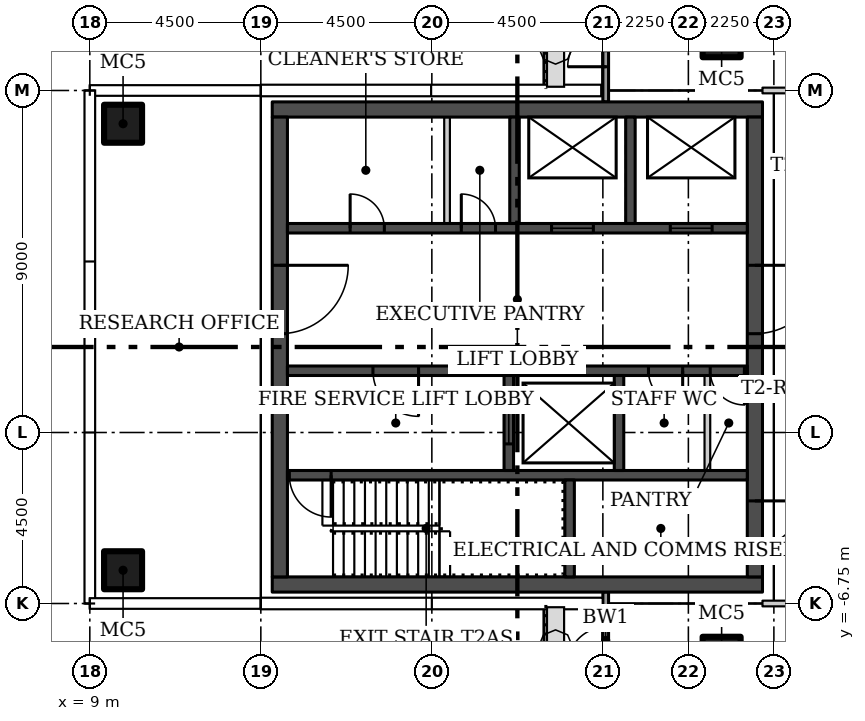
"""IFC4 building model, lengths in metres.
Left out: names, types, materials, properties, quantities, classifications, styles, units other than length and angle.
Written with IfcOpenShell. Run it as: python <this file> out.ifc"""

import sys

from ifc_helpers import new_model, si_unit, direction, frame, frame_2d, origin, origin_2d, place, context, subcontext, project, spatial, rectangle, hollow_rectangle, extrude, element, fill, save


model = new_model("IFC4")
c1 = context("Model", 3, precision=1e-05, world=origin(), true_north=direction((0.0, 1.0)))
c2 = subcontext(c1, "Body", "Model", "MODEL_VIEW")
j1 = project(units=[si_unit("LENGTHUNIT", "METRE"), si_unit("PLANEANGLEUNIT", "RADIAN")], contexts=[c1])
p1 = place(None, origin())
s1 = spatial("IfcSite", under=j1, at=p1, CompositionType="ELEMENT")
p2 = place(p1, origin())
s2 = spatial("IfcBuilding", under=s1, at=p2, CompositionType="ELEMENT")
p3 = place(p2, frame((0.0, 0.0, 186.6)))
s3 = spatial("IfcBuildingStorey", under=s2, at=p3, CompositionType="ELEMENT", Elevation=186.6)
for number, where in (
    (1, (25.625, 8.125, 0.0)),
    (2, (25.625, -8.125, 0.0)),
    (3, (9.875, -5.875, 0.0)),
    (4, (9.875, 5.875, 0.0)),
):
    element("IfcColumn", number, at=place(p3, frame(where)), inside=s3, PredefinedType="COLUMN", context=c2, shape_type="SweptSolid", body=[
        extrude(hollow_rectangle(XDim=1.0, YDim=1.0, WallThickness=0.04, at=origin_2d()), origin(), (0.0, 0.0, 1.0), 3.55),
    ])
p4 = place(p3, frame((26.7, 6.75, 0.0)))
e5 = element("IfcWall", 5, at=p4, inside=s3, PredefinedType="PARTITIONING", context=c2, shape_type="SweptSolid", body=[
    extrude(rectangle(XDim=14.1, YDim=0.15, at=frame_2d((7.05, 0.0))), origin(), (0.0, 0.0, 1.0), 3.55),
])
p5 = place(p4, frame((10.8, 0.0, 0.0)))
e6 = element("IfcOpeningElement", 6, at=p5, cuts=e5, PredefinedType="OPENING", context=c2, shape_type="SweptSolid", body=[
    extrude(rectangle(XDim=1.5, YDim=2.1, at=frame_2d((0.75, 1.05))), frame((0.0, 0.085, 0.0), z_axis=(0.0, -1.0, 0.0), x_axis=(1.0, 0.0, 0.0)), (0.0, 0.0, 1.0), 0.17),
])
p6 = place(p4, frame((6.6, 0.0, 0.0)))
e7 = element("IfcOpeningElement", 7, at=p6, cuts=e5, PredefinedType="OPENING", context=c2, shape_type="SweptSolid", body=[
    extrude(rectangle(XDim=0.9, YDim=2.1, at=frame_2d((0.45, 1.05))), frame((0.0, 0.085, 0.0), z_axis=(0.0, -1.0, 0.0), x_axis=(1.0, 0.0, 0.0)), (0.0, 0.0, 1.0), 0.17),
])
p7 = place(p4, frame((1.8, 0.0, 0.0)))
e8 = element("IfcOpeningElement", 8, at=p7, cuts=e5, PredefinedType="OPENING", context=c2, shape_type="SweptSolid", body=[
    extrude(rectangle(XDim=1.5, YDim=2.1, at=frame_2d((0.75, 1.05))), frame((0.0, 0.085, 0.0), z_axis=(0.0, -1.0, 0.0), x_axis=(1.0, 0.0, 0.0)), (0.0, 0.0, 1.0), 0.17),
])
p8 = place(p3, frame((40.8, -6.75, 0.0), z_axis=(0.0, 0.0, 1.0), x_axis=(-1.0, 0.0, 0.0)))
e9 = element("IfcWall", 9, at=p8, inside=s3, PredefinedType="PARTITIONING", context=c2, shape_type="SweptSolid", body=[
    extrude(rectangle(XDim=14.1, YDim=0.15, at=frame_2d((7.05, 0.0))), origin(), (0.0, 0.0, 1.0), 3.55),
])
p9 = place(p8, frame((6.3, 0.0, 0.0)))
e10 = element("IfcOpeningElement", 10, at=p9, cuts=e9, PredefinedType="OPENING", context=c2, shape_type="SweptSolid", body=[
    extrude(rectangle(XDim=1.5, YDim=2.1, at=frame_2d((0.75, 1.05))), frame((0.0, 0.085, 0.0), z_axis=(0.0, -1.0, 0.0), x_axis=(1.0, 0.0, 0.0)), (0.0, 0.0, 1.0), 0.17),
])
p10 = place(p3, frame((22.575, 6.448, 0.0), z_axis=(0.0, 0.0, 1.0), x_axis=(0.0, 1.0, 0.0)))
e11 = element("IfcWall", 11, at=p10, inside=s3, PredefinedType="SOLIDWALL", context=c2, shape_type="SweptSolid", body=[
    extrude(rectangle(XDim=2.552, YDim=0.15, at=frame_2d((1.276, 0.0))), origin(), (0.0, 0.0, 1.0), 3.45),
])
p11 = place(p10, frame((0.927, 0.0, 0.0)))
e12 = element("IfcOpeningElement", 12, at=p11, cuts=e11, PredefinedType="OPENING", context=c2, shape_type="SweptSolid", body=[
    extrude(rectangle(XDim=1.0, YDim=2.4, at=frame_2d((0.5, 1.2))), frame((0.0, 0.085, 0.0), z_axis=(0.0, -1.0, 0.0), x_axis=(1.0, 0.0, 0.0)), (0.0, 0.0, 1.0), 0.17),
])
p12 = place(p3, frame((22.575, -9.0, 0.0), z_axis=(0.0, 0.0, 1.0), x_axis=(0.0, 1.0, 0.0)))
e13 = element("IfcWall", 13, at=p12, inside=s3, PredefinedType="SOLIDWALL", context=c2, shape_type="SweptSolid", body=[
    extrude(rectangle(XDim=2.557, YDim=0.15, at=frame_2d((1.278, 0.0))), origin(), (0.0, 0.0, 1.0), 3.45),
])
p13 = place(p12, frame((0.625, 0.0, 0.0)))
e14 = element("IfcOpeningElement", 14, at=p13, cuts=e13, PredefinedType="OPENING", context=c2, shape_type="SweptSolid", body=[
    extrude(rectangle(XDim=1.0, YDim=2.4, at=frame_2d((0.5, 1.2))), frame((0.0, 0.085, 0.0), z_axis=(0.0, -1.0, 0.0), x_axis=(1.0, 0.0, 0.0)), (0.0, 0.0, 1.0), 0.17),
])
for number, where in (
    (15, (13.8, -6.25, 0.0)),
    (16, (13.8, 6.25, 0.0)),
):
    element("IfcWall", number, at=place(p3, frame(where)), inside=s3, PredefinedType="SHEAR", context=c2, shape_type="SweptSolid", body=[
        extrude(rectangle(XDim=12.9, YDim=0.4, at=frame_2d((6.45, 0.0))), origin(), (0.0, 0.0, 1.0), 3.55),
    ])
p14 = place(p3, frame((14.0, 6.05, 0.0), z_axis=(0.0, 0.0, 1.0), x_axis=(0.0, -1.0, 0.0)))
e17 = element("IfcWall", 17, at=p14, inside=s3, PredefinedType="SHEAR", context=c2, shape_type="SweptSolid", body=[
    extrude(rectangle(XDim=12.1, YDim=0.4, at=frame_2d((6.05, 0.0))), origin(), (0.0, 0.0, 1.0), 3.55),
])
p15 = place(p14, frame((3.9, 0.0, 0.0)))
e18 = element("IfcOpeningElement", 18, at=p15, cuts=e17, PredefinedType="OPENING", context=c2, shape_type="SweptSolid", body=[
    extrude(rectangle(XDim=1.8, YDim=2.4, at=frame_2d((0.9, 1.2))), frame((0.0, 0.21, 0.0), z_axis=(0.0, -1.0, 0.0), x_axis=(1.0, 0.0, 0.0)), (0.0, 0.0, 1.0), 0.42),
])
p16 = place(p3, frame((26.5, 6.05, 0.0), z_axis=(0.0, 0.0, 1.0), x_axis=(0.0, -1.0, 0.0)))
e19 = element("IfcWall", 19, at=p16, inside=s3, PredefinedType="SHEAR", context=c2, shape_type="SweptSolid", body=[
    extrude(rectangle(XDim=12.1, YDim=0.4, at=frame_2d((6.05, 0.0))), origin(), (0.0, 0.0, 1.0), 3.55),
])
p17 = place(p16, frame((10.1, 0.0, 0.0)))
e20 = element("IfcOpeningElement", 20, at=p17, cuts=e19, PredefinedType="OPENING", context=c2, shape_type="SweptSolid", body=[
    extrude(rectangle(XDim=1.2, YDim=2.1, at=frame_2d((0.6, 1.05))), frame((0.0, 0.21, 0.0), z_axis=(0.0, -1.0, 0.0), x_axis=(1.0, 0.0, 0.0)), (0.0, 0.0, 1.0), 0.42),
])
p18 = place(p16, frame((3.9, 0.0, 0.0)))
e21 = element("IfcOpeningElement", 21, at=p18, cuts=e19, PredefinedType="OPENING", context=c2, shape_type="SweptSolid", body=[
    extrude(rectangle(XDim=1.8, YDim=2.4, at=frame_2d((0.9, 1.2))), frame((0.0, 0.21, 0.0), z_axis=(0.0, -1.0, 0.0), x_axis=(1.0, 0.0, 0.0)), (0.0, 0.0, 1.0), 0.42),
])
p19 = place(p3, frame((26.3, -3.375, 0.0), z_axis=(0.0, 0.0, 1.0), x_axis=(-1.0, 0.0, 0.0)))
e22 = element("IfcWall", 22, at=p19, inside=s3, PredefinedType="SHEAR", context=c2, shape_type="SweptSolid", body=[
    extrude(rectangle(XDim=12.1, YDim=0.25, at=frame_2d((6.05, 0.0))), origin(), (0.0, 0.0, 1.0), 3.55),
])
p20 = place(p19, frame((10.95, 0.0, 0.0)))
e23 = element("IfcOpeningElement", 23, at=p20, cuts=e22, PredefinedType="OPENING", context=c2, shape_type="SweptSolid", body=[
    extrude(rectangle(XDim=1.1, YDim=2.1, at=frame_2d((0.55, 1.05))), frame((0.0, 0.135, 0.0), z_axis=(0.0, -1.0, 0.0), x_axis=(1.0, 0.0, 0.0)), (0.0, 0.0, 1.0), 0.27),
])
p21 = place(p3, frame((21.625, -6.05, 0.0), z_axis=(0.0, 0.0, 1.0), x_axis=(0.0, 1.0, 0.0)))
e24 = element("IfcWall", 24, at=p21, inside=s3, PredefinedType="SHEAR", context=c2, shape_type="SweptSolid", body=[
    extrude(rectangle(XDim=2.55, YDim=0.25, at=frame_2d((1.275, 0.0))), origin(), (0.0, 0.0, 1.0), 3.55),
])
p22 = place(p3, frame((26.3, -0.625, 0.0), z_axis=(0.0, 0.0, 1.0), x_axis=(-1.0, 0.0, 0.0)))
e25 = element("IfcWall", 25, at=p22, inside=s3, PredefinedType="SHEAR", context=c2, shape_type="SweptSolid", body=[
    extrude(rectangle(XDim=12.1, YDim=0.25, at=frame_2d((6.05, 0.0))), origin(), (0.0, 0.0, 1.0), 3.55),
])
p23 = place(p22, frame((8.65, 0.0, 0.0)))
e26 = element("IfcOpeningElement", 26, at=p23, cuts=e25, PredefinedType="OPENING", context=c2, shape_type="SweptSolid", body=[
    extrude(rectangle(XDim=1.2, YDim=2.1, at=frame_2d((0.6, 1.05))), frame((0.0, 0.135, 0.0), z_axis=(0.0, -1.0, 0.0), x_axis=(1.0, 0.0, 0.0)), (0.0, 0.0, 1.0), 0.27),
])
p24 = place(p22, frame((1.7, 0.0, 0.0)))
e27 = element("IfcOpeningElement", 27, at=p24, cuts=e25, PredefinedType="OPENING", context=c2, shape_type="SweptSolid", body=[
    extrude(rectangle(XDim=0.9, YDim=2.1, at=frame_2d((0.45, 1.05))), frame((0.0, 0.135, 0.0), z_axis=(0.0, -1.0, 0.0), x_axis=(1.0, 0.0, 0.0)), (0.0, 0.0, 1.0), 0.27),
])
p25 = place(p22, frame((0.075, 0.0, 0.0)))
e28 = element("IfcOpeningElement", 28, at=p25, cuts=e25, PredefinedType="OPENING", context=c2, shape_type="SweptSolid", body=[
    extrude(rectangle(XDim=0.9, YDim=2.1, at=frame_2d((0.45, 1.05))), frame((0.0, 0.135, 0.0), z_axis=(0.0, -1.0, 0.0), x_axis=(1.0, 0.0, 0.0)), (0.0, 0.0, 1.0), 0.27),
])
p26 = place(p3, frame((20.025, -3.25, 0.0), z_axis=(0.0, 0.0, 1.0), x_axis=(0.0, 1.0, 0.0)))
e29 = element("IfcWall", 29, at=p26, inside=s3, PredefinedType="SHEAR", context=c2, shape_type="SweptSolid", body=[
    extrude(rectangle(XDim=2.5, YDim=0.25, at=frame_2d((1.25, 0.0))), origin(), (0.0, 0.0, 1.0), 3.55),
])
p27 = place(p26, frame((0.7, 0.0, 0.0)))
e30 = element("IfcOpeningElement", 30, at=p27, cuts=e29, PredefinedType="OPENING", context=c2, shape_type="SweptSolid", body=[
    extrude(rectangle(XDim=1.1, YDim=2.1, at=frame_2d((0.55, 1.05))), frame((0.0, 0.135, 0.0), z_axis=(0.0, -1.0, 0.0), x_axis=(1.0, 0.0, 0.0)), (0.0, 0.0, 1.0), 0.27),
])
p28 = place(p3, frame((22.925, -3.25, 0.0), z_axis=(0.0, 0.0, 1.0), x_axis=(0.0, 1.0, 0.0)))
e31 = element("IfcWall", 31, at=p28, inside=s3, PredefinedType="SHEAR", context=c2, shape_type="SweptSolid", body=[
    extrude(rectangle(XDim=2.5, YDim=0.25, at=frame_2d((1.25, 0.0))), origin(), (0.0, 0.0, 1.0), 3.55),
])
p29 = place(p3, frame((25.25, -3.25, 0.0), z_axis=(0.0, 0.0, 1.0), x_axis=(0.0, 1.0, 0.0)))
e32 = element("IfcWall", 32, at=p29, inside=s3, PredefinedType="PARTITIONING", context=c2, shape_type="SweptSolid", body=[
    extrude(rectangle(XDim=2.5, YDim=0.15, at=frame_2d((1.25, 0.0))), origin(), (0.0, 0.0, 1.0), 3.55),
])
p30 = place(p3, frame((14.2, 3.125, 0.0)))
e33 = element("IfcWall", 33, at=p30, inside=s3, PredefinedType="SHEAR", context=c2, shape_type="SweptSolid", body=[
    extrude(rectangle(XDim=12.1, YDim=0.25, at=frame_2d((6.05, 0.0))), origin(), (0.0, 0.0, 1.0), 3.55),
])
p31 = place(p30, frame((6.95, 0.0, 0.0)))
e34 = element("IfcOpeningElement", 34, at=p31, cuts=e33, PredefinedType="OPENING", context=c2, shape_type="SweptSolid", body=[
    extrude(rectangle(XDim=1.1, YDim=2.1, at=frame_2d((0.55, 1.05))), frame((0.0, 0.135, 0.0), z_axis=(0.0, -1.0, 0.0), x_axis=(1.0, 0.0, 0.0)), (0.0, 0.0, 1.0), 0.27),
])
p32 = place(p30, frame((10.075, 0.0, 0.0)))
e35 = element("IfcOpeningElement", 35, at=p32, cuts=e33, PredefinedType="OPENING", context=c2, shape_type="SweptSolid", body=[
    extrude(rectangle(XDim=1.1, YDim=2.1, at=frame_2d((0.55, 1.05))), frame((0.0, 0.135, 0.0), z_axis=(0.0, -1.0, 0.0), x_axis=(1.0, 0.0, 0.0)), (0.0, 0.0, 1.0), 0.27),
])
p33 = place(p30, frame((1.65, 0.0, 0.0)))
e36 = element("IfcOpeningElement", 36, at=p33, cuts=e33, PredefinedType="OPENING", context=c2, shape_type="SweptSolid", body=[
    extrude(rectangle(XDim=0.9, YDim=2.1, at=frame_2d((0.45, 1.05))), frame((0.0, 0.135, 0.0), z_axis=(0.0, -1.0, 0.0), x_axis=(1.0, 0.0, 0.0)), (0.0, 0.0, 1.0), 0.27),
])
p34 = place(p30, frame((4.575, 0.0, 0.0)))
e37 = element("IfcOpeningElement", 37, at=p34, cuts=e33, PredefinedType="OPENING", context=c2, shape_type="SweptSolid", body=[
    extrude(rectangle(XDim=0.9, YDim=2.1, at=frame_2d((0.45, 1.05))), frame((0.0, 0.135, 0.0), z_axis=(0.0, -1.0, 0.0), x_axis=(1.0, 0.0, 0.0)), (0.0, 0.0, 1.0), 0.27),
])
for number, where, z_axis, x_axis in (
    (38, (20.175, 3.25, 0.0), (0.0, 0.0, 1.0), (0.0, 1.0, 0.0)),
    (39, (23.225, 3.25, 0.0), (0.0, 0.0, 1.0), (0.0, 1.0, 0.0)),
):
    element("IfcWall", number, at=place(p3, frame(where, z_axis=z_axis, x_axis=x_axis)), inside=s3, PredefinedType="SHEAR", context=c2, shape_type="SweptSolid", body=[
        extrude(rectangle(XDim=2.8, YDim=0.25, at=frame_2d((1.4, 0.0))), origin(), (0.0, 0.0, 1.0), 3.55),
    ])
p35 = place(p3, frame((18.4, 3.25, 0.0), z_axis=(0.0, 0.0, 1.0), x_axis=(0.0, 1.0, 0.0)))
e40 = element("IfcWall", 40, at=p35, inside=s3, PredefinedType="PARTITIONING", context=c2, shape_type="SweptSolid", body=[
    extrude(rectangle(XDim=2.8, YDim=0.15, at=frame_2d((1.4, 0.0))), origin(), (0.0, 0.0, 1.0), 3.55),
])
p36 = place(p11, origin())
e41 = element("IfcDoor", 41, at=p36, inside=s3, OperationType="SINGLE_SWING_LEFT", PredefinedType="DOOR", context=c2, shape_type="SweptSolid", body=[
    extrude(rectangle(XDim=1.0, YDim=2.4, at=frame_2d((0.5, 1.2))), frame((0.0, 0.025, 0.0), z_axis=(0.0, -1.0, 0.0), x_axis=(1.0, 0.0, 0.0)), (0.0, 0.0, 1.0), 0.05),
])
fill(e12, e41)
p37 = place(p13, origin())
e42 = element("IfcDoor", 42, at=p37, inside=s3, OperationType="SINGLE_SWING_LEFT", PredefinedType="DOOR", context=c2, shape_type="SweptSolid", body=[
    extrude(rectangle(XDim=1.0, YDim=2.4, at=frame_2d((0.5, 1.2))), frame((0.0, 0.025, 0.0), z_axis=(0.0, -1.0, 0.0), x_axis=(1.0, 0.0, 0.0)), (0.0, 0.0, 1.0), 0.05),
])
fill(e14, e42)
p38 = place(p15, origin())
e43 = element("IfcDoor", 43, at=p38, inside=s3, OperationType="DOUBLE_DOOR_SINGLE_SWING", PredefinedType="DOOR", context=c2, shape_type="SweptSolid", body=[
    extrude(rectangle(XDim=1.8, YDim=2.4, at=frame_2d((0.9, 1.2))), frame((0.0, 0.025, 0.0), z_axis=(0.0, -1.0, 0.0), x_axis=(1.0, 0.0, 0.0)), (0.0, 0.0, 1.0), 0.05),
])
fill(e18, e43)
p39 = place(p17, origin())
e44 = element("IfcDoor", 44, at=p39, inside=s3, OperationType="SINGLE_SWING_RIGHT", PredefinedType="DOOR", context=c2, shape_type="SweptSolid", body=[
    extrude(rectangle(XDim=1.2, YDim=2.1, at=frame_2d((0.6, 1.05))), frame((0.0, 0.025, 0.0), z_axis=(0.0, -1.0, 0.0), x_axis=(1.0, 0.0, 0.0)), (0.0, 0.0, 1.0), 0.05),
])
fill(e20, e44)
p40 = place(p18, origin())
e45 = element("IfcDoor", 45, at=p40, inside=s3, OperationType="DOUBLE_DOOR_SINGLE_SWING", PredefinedType="DOOR", context=c2, shape_type="SweptSolid", body=[
    extrude(rectangle(XDim=1.8, YDim=2.4, at=frame_2d((0.9, 1.2))), frame((0.0, 0.025, 0.0), z_axis=(0.0, -1.0, 0.0), x_axis=(1.0, 0.0, 0.0)), (0.0, 0.0, 1.0), 0.05),
])
fill(e21, e45)
p41 = place(p20, origin())
e46 = element("IfcDoor", 46, at=p41, inside=s3, OperationType="SINGLE_SWING_RIGHT", PredefinedType="DOOR", context=c2, shape_type="SweptSolid", body=[
    extrude(rectangle(XDim=1.1, YDim=2.1, at=frame_2d((0.55, 1.05))), frame((0.0, 0.025, 0.0), z_axis=(0.0, -1.0, 0.0), x_axis=(1.0, 0.0, 0.0)), (0.0, 0.0, 1.0), 0.05),
])
fill(e23, e46)
p42 = place(p23, origin())
e47 = element("IfcDoor", 47, at=p42, inside=s3, OperationType="SINGLE_SWING_RIGHT", PredefinedType="DOOR", context=c2, shape_type="SweptSolid", body=[
    extrude(rectangle(XDim=1.2, YDim=2.1, at=frame_2d((0.6, 1.05))), frame((0.0, 0.025, 0.0), z_axis=(0.0, -1.0, 0.0), x_axis=(1.0, 0.0, 0.0)), (0.0, 0.0, 1.0), 0.05),
])
fill(e26, e47)
p43 = place(p24, origin())
e48 = element("IfcDoor", 48, at=p43, inside=s3, OperationType="SINGLE_SWING_LEFT", PredefinedType="DOOR", context=c2, shape_type="SweptSolid", body=[
    extrude(rectangle(XDim=0.9, YDim=2.1, at=frame_2d((0.45, 1.05))), frame((0.0, 0.025, 0.0), z_axis=(0.0, -1.0, 0.0), x_axis=(1.0, 0.0, 0.0)), (0.0, 0.0, 1.0), 0.05),
])
fill(e27, e48)
p44 = place(p25, origin())
e49 = element("IfcDoor", 49, at=p44, inside=s3, OperationType="SINGLE_SWING_LEFT", PredefinedType="DOOR", context=c2, shape_type="SweptSolid", body=[
    extrude(rectangle(XDim=0.9, YDim=2.1, at=frame_2d((0.45, 1.05))), frame((0.0, 0.025, 0.0), z_axis=(0.0, -1.0, 0.0), x_axis=(1.0, 0.0, 0.0)), (0.0, 0.0, 1.0), 0.05),
])
fill(e28, e49)
p45 = place(p27, origin())
e50 = element("IfcDoor", 50, at=p45, inside=s3, OperationType="SLIDING_TO_LEFT", PredefinedType="DOOR", context=c2, shape_type="SweptSolid", body=[
    extrude(rectangle(XDim=1.1, YDim=2.1, at=frame_2d((0.55, 1.05))), frame((0.0, 0.025, 0.0), z_axis=(0.0, -1.0, 0.0), x_axis=(1.0, 0.0, 0.0)), (0.0, 0.0, 1.0), 0.05),
])
fill(e30, e50)
p46 = place(p31, origin())
e51 = element("IfcDoor", 51, at=p46, inside=s3, OperationType="SLIDING_TO_LEFT", PredefinedType="DOOR", context=c2, shape_type="SweptSolid", body=[
    extrude(rectangle(XDim=1.1, YDim=2.1, at=frame_2d((0.55, 1.05))), frame((0.0, 0.025, 0.0), z_axis=(0.0, -1.0, 0.0), x_axis=(1.0, 0.0, 0.0)), (0.0, 0.0, 1.0), 0.05),
])
fill(e34, e51)
p47 = place(p32, origin())
e52 = element("IfcDoor", 52, at=p47, inside=s3, OperationType="SLIDING_TO_LEFT", PredefinedType="DOOR", context=c2, shape_type="SweptSolid", body=[
    extrude(rectangle(XDim=1.1, YDim=2.1, at=frame_2d((0.55, 1.05))), frame((0.0, 0.025, 0.0), z_axis=(0.0, -1.0, 0.0), x_axis=(1.0, 0.0, 0.0)), (0.0, 0.0, 1.0), 0.05),
])
fill(e35, e52)
p48 = place(p33, origin())
e53 = element("IfcDoor", 53, at=p48, inside=s3, OperationType="SINGLE_SWING_LEFT", PredefinedType="DOOR", context=c2, shape_type="SweptSolid", body=[
    extrude(rectangle(XDim=0.9, YDim=2.1, at=frame_2d((0.45, 1.05))), frame((0.0, 0.025, 0.0), z_axis=(0.0, -1.0, 0.0), x_axis=(1.0, 0.0, 0.0)), (0.0, 0.0, 1.0), 0.05),
])
fill(e36, e53)
p49 = place(p34, origin())
e54 = element("IfcDoor", 54, at=p49, inside=s3, OperationType="SINGLE_SWING_LEFT", PredefinedType="DOOR", context=c2, shape_type="SweptSolid", body=[
    extrude(rectangle(XDim=0.9, YDim=2.1, at=frame_2d((0.45, 1.05))), frame((0.0, 0.025, 0.0), z_axis=(0.0, -1.0, 0.0), x_axis=(1.0, 0.0, 0.0)), (0.0, 0.0, 1.0), 0.05),
])
fill(e37, e54)
save(model, sys.argv[1])
